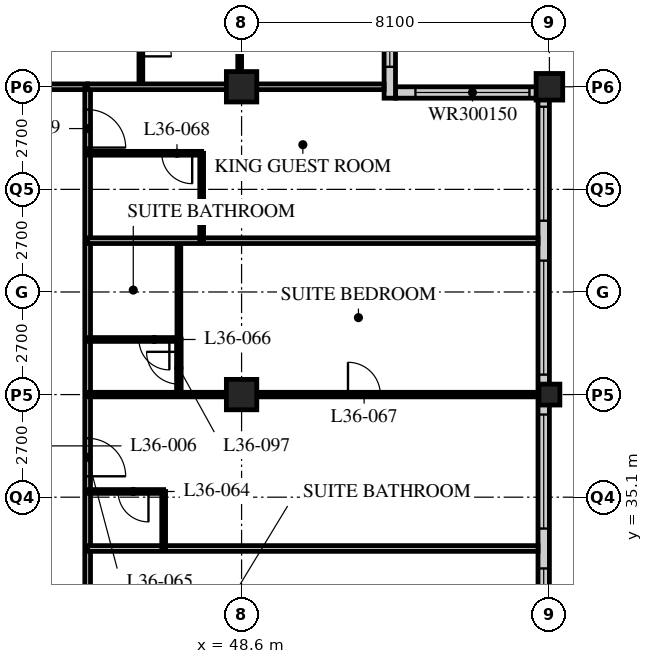
"""IFC4 building model, lengths in metres.
Left out: names, types, materials, properties, quantities, classifications, styles, units other than length and angle.
Written with IfcOpenShell. Run it as: python <this file> out.ifc"""

import sys

from ifc_helpers import new_model, si_unit, direction, frame, frame_2d, origin, origin_2d, place, context, subcontext, project, spatial, rectangle, hollow_rectangle, extrude, element, fill, save


model = new_model("IFC4")
c1 = context("Model", 3, precision=1e-05, world=origin(), true_north=direction((0.0, 1.0)))
c2 = subcontext(c1, "Body", "Model", "MODEL_VIEW")
j1 = project(units=[si_unit("LENGTHUNIT", "METRE"), si_unit("PLANEANGLEUNIT", "RADIAN")], contexts=[c1])
p1 = place(None, origin())
s1 = spatial("IfcSite", under=j1, at=p1, CompositionType="ELEMENT")
p2 = place(p1, origin())
s2 = spatial("IfcBuilding", under=s1, at=p2, CompositionType="ELEMENT")
p3 = place(p2, frame((0.0, 0.0, 140.8)))
s3 = spatial("IfcBuildingStorey", under=s2, at=p3, CompositionType="ELEMENT", Elevation=140.8)
for number, where, z_axis, x_axis in (
    (1, (48.6, 37.8, 0.0), (0.0, 0.0, 1.0), (1.0, 0.0, 0.0)),
    (2, (48.6, 45.9, 0.0), (0.0, 0.0, 1.0), (1.0, 0.0, 0.0)),
):
    element("IfcColumn", number, at=place(p3, frame(where, z_axis=z_axis, x_axis=x_axis)), inside=s3, PredefinedType="COLUMN", context=c2, shape_type="SweptSolid", body=[
        extrude(hollow_rectangle(XDim=0.8, YDim=0.8, WallThickness=0.08, at=origin_2d()), origin(), (0.0, 0.0, 1.0), 3.4),
    ])
p4 = place(p3, frame((56.7, 37.8, 0.0), z_axis=(0.0, 0.0, 1.0), x_axis=(1.0, 0.0, 0.0)))
e3 = element("IfcColumn", 3, at=p4, inside=s3, PredefinedType="COLUMN", context=c2, shape_type="SweptSolid", body=[
    extrude(hollow_rectangle(XDim=0.55, YDim=0.55, WallThickness=0.04, at=origin_2d()), origin(), (0.0, 0.0, 1.0), 3.4),
])
p5 = place(p3, frame((56.7, 45.9, 0.0), z_axis=(0.0, 0.0, 1.0), x_axis=(1.0, 0.0, 0.0)))
e4 = element("IfcColumn", 4, at=p5, inside=s3, PredefinedType="COLUMN", context=c2, shape_type="SweptSolid", body=[
    extrude(hollow_rectangle(XDim=0.7, YDim=0.7, WallThickness=0.07, at=origin_2d()), origin(), (0.0, 0.0, 1.0), 3.4),
])
p6 = place(p3, frame((56.55, 13.8, 0.0), z_axis=(0.0, 0.0, 1.0), x_axis=(0.0, 1.0, 0.0)))
e5 = element("IfcWall", 5, at=p6, inside=s3, PredefinedType="SOLIDWALL", context=c2, shape_type="SweptSolid", body=[
    extrude(rectangle(XDim=32.1, YDim=0.3, at=frame_2d((16.05, 0.0))), origin(), (0.0, 0.0, 1.0), 3.19),
])
p7 = place(p6, frame((0.225, 0.0, 0.9)))
e6 = element("IfcOpeningElement", 6, at=p7, cuts=e5, PredefinedType="OPENING", context=c2, shape_type="SweptSolid", body=[
    extrude(rectangle(XDim=3.0, YDim=2.0, at=frame_2d((1.5, 1.0))), frame((0.0, 0.16, 0.0), z_axis=(0.0, -1.0, 0.0), x_axis=(1.0, 0.0, 0.0)), (0.0, 0.0, 1.0), 0.32),
])
p8 = place(p6, frame((4.275, 0.0, 0.9)))
e7 = element("IfcOpeningElement", 7, at=p8, cuts=e5, PredefinedType="OPENING", context=c2, shape_type="SweptSolid", body=[
    extrude(rectangle(XDim=3.0, YDim=2.0, at=frame_2d((1.5, 1.0))), frame((0.0, 0.16, 0.0), z_axis=(0.0, -1.0, 0.0), x_axis=(1.0, 0.0, 0.0)), (0.0, 0.0, 1.0), 0.32),
])
p9 = place(p6, frame((8.325, 0.0, 0.9)))
e8 = element("IfcOpeningElement", 8, at=p9, cuts=e5, PredefinedType="OPENING", context=c2, shape_type="SweptSolid", body=[
    extrude(rectangle(XDim=3.0, YDim=2.0, at=frame_2d((1.5, 1.0))), frame((0.0, 0.16, 0.0), z_axis=(0.0, -1.0, 0.0), x_axis=(1.0, 0.0, 0.0)), (0.0, 0.0, 1.0), 0.32),
])
p10 = place(p6, frame((12.375, 0.0, 0.9)))
e9 = element("IfcOpeningElement", 9, at=p10, cuts=e5, PredefinedType="OPENING", context=c2, shape_type="SweptSolid", body=[
    extrude(rectangle(XDim=3.0, YDim=2.0, at=frame_2d((1.5, 1.0))), frame((0.0, 0.16, 0.0), z_axis=(0.0, -1.0, 0.0), x_axis=(1.0, 0.0, 0.0)), (0.0, 0.0, 1.0), 0.32),
])
p11 = place(p6, frame((16.425, 0.0, 0.9)))
e10 = element("IfcOpeningElement", 10, at=p11, cuts=e5, PredefinedType="OPENING", context=c2, shape_type="SweptSolid", body=[
    extrude(rectangle(XDim=3.0, YDim=2.0, at=frame_2d((1.5, 1.0))), frame((0.0, 0.16, 0.0), z_axis=(0.0, -1.0, 0.0), x_axis=(1.0, 0.0, 0.0)), (0.0, 0.0, 1.0), 0.32),
])
p12 = place(p6, frame((20.475, 0.0, 0.9)))
e11 = element("IfcOpeningElement", 11, at=p12, cuts=e5, PredefinedType="OPENING", context=c2, shape_type="SweptSolid", body=[
    extrude(rectangle(XDim=3.0, YDim=2.0, at=frame_2d((1.5, 1.0))), frame((0.0, 0.16, 0.0), z_axis=(0.0, -1.0, 0.0), x_axis=(1.0, 0.0, 0.0)), (0.0, 0.0, 1.0), 0.32),
])
p13 = place(p6, frame((24.525, 0.0, 0.9)))
e12 = element("IfcOpeningElement", 12, at=p13, cuts=e5, PredefinedType="OPENING", context=c2, shape_type="SweptSolid", body=[
    extrude(rectangle(XDim=3.0, YDim=2.0, at=frame_2d((1.5, 1.0))), frame((0.0, 0.16, 0.0), z_axis=(0.0, -1.0, 0.0), x_axis=(1.0, 0.0, 0.0)), (0.0, 0.0, 1.0), 0.32),
])
p14 = place(p6, frame((28.575, 0.0, 0.9)))
e13 = element("IfcOpeningElement", 13, at=p14, cuts=e5, PredefinedType="OPENING", context=c2, shape_type="SweptSolid", body=[
    extrude(rectangle(XDim=3.0, YDim=2.0, at=frame_2d((1.5, 1.0))), frame((0.0, 0.16, 0.0), z_axis=(0.0, -1.0, 0.0), x_axis=(1.0, 0.0, 0.0)), (0.0, 0.0, 1.0), 0.32),
])
p15 = place(p3, frame((56.4, 45.75, 0.0), z_axis=(0.0, 0.0, 1.0), x_axis=(-1.0, 0.0, 0.0)))
e14 = element("IfcWall", 14, at=p15, inside=s3, PredefinedType="SOLIDWALL", context=c2, shape_type="SweptSolid", body=[
    extrude(rectangle(XDim=3.75, YDim=0.3, at=frame_2d((1.875, 0.0))), origin(), (0.0, 0.0, 1.0), 3.19),
])
p16 = place(p15, frame((0.225, 0.0, 0.9)))
e15 = element("IfcOpeningElement", 15, at=p16, cuts=e14, PredefinedType="OPENING", context=c2, shape_type="SweptSolid", body=[
    extrude(rectangle(XDim=3.0, YDim=1.5, at=frame_2d((1.5, 0.75))), frame((0.0, 0.16, 0.0), z_axis=(0.0, -1.0, 0.0), x_axis=(1.0, 0.0, 0.0)), (0.0, 0.0, 1.0), 0.32),
])
p17 = place(p3, frame((52.5, 45.6, 0.0), z_axis=(0.0, 0.0, 1.0), x_axis=(0.0, 1.0, 0.0)))
e16 = element("IfcWall", 16, at=p17, inside=s3, PredefinedType="SOLIDWALL", context=c2, shape_type="SweptSolid", body=[
    extrude(rectangle(XDim=4.35, YDim=0.3, at=frame_2d((2.175, 0.0))), origin(), (0.0, 0.0, 1.0), 3.19),
])
p18 = place(p17, frame((0.825, 0.0, 0.9)))
e17 = element("IfcOpeningElement", 17, at=p18, cuts=e16, PredefinedType="OPENING", context=c2, shape_type="SweptSolid", body=[
    extrude(rectangle(XDim=3.0, YDim=1.5, at=frame_2d((1.5, 0.75))), frame((0.0, 0.16, 0.0), z_axis=(0.0, -1.0, 0.0), x_axis=(1.0, 0.0, 0.0)), (0.0, 0.0, 1.0), 0.32),
])
p19 = place(p3, frame((8.1, 45.9, 0.0), z_axis=(0.0, 0.0, 1.0), x_axis=(1.0, 0.0, 0.0)))
e18 = element("IfcWall", 18, at=p19, inside=s3, PredefinedType="PARTITIONING", context=c2, shape_type="SweptSolid", body=[
    extrude(rectangle(XDim=36.45, YDim=0.15, at=frame_2d((18.225, 0.0))), origin(), (0.0, 0.0, 1.0), 2.578),
])
p20 = place(p19, frame((9.625, 0.0, 0.0)))
e19 = element("IfcOpeningElement", 19, at=p20, cuts=e18, PredefinedType="OPENING", context=c2, shape_type="SweptSolid", body=[
    extrude(rectangle(XDim=1.0, YDim=2.1, at=frame_2d((0.5, 1.05))), frame((0.0, 0.085, 0.0), z_axis=(0.0, -1.0, 0.0), x_axis=(1.0, 0.0, 0.0)), (0.0, 0.0, 1.0), 0.17),
])
p21 = place(p19, frame((21.775, 0.0, 0.0)))
e20 = element("IfcOpeningElement", 20, at=p21, cuts=e18, PredefinedType="OPENING", context=c2, shape_type="SweptSolid", body=[
    extrude(rectangle(XDim=1.0, YDim=2.1, at=frame_2d((0.5, 1.05))), frame((0.0, 0.085, 0.0), z_axis=(0.0, -1.0, 0.0), x_axis=(1.0, 0.0, 0.0)), (0.0, 0.0, 1.0), 0.17),
])
p22 = place(p19, frame((28.95, 0.0, 0.0)))
e21 = element("IfcOpeningElement", 21, at=p22, cuts=e18, PredefinedType="OPENING", context=c2, shape_type="SweptSolid", body=[
    extrude(rectangle(XDim=1.0, YDim=2.1, at=frame_2d((0.5, 1.05))), frame((0.0, 0.085, 0.0), z_axis=(0.0, -1.0, 0.0), x_axis=(1.0, 0.0, 0.0)), (0.0, 0.0, 1.0), 0.17),
])
p23 = place(p19, frame((33.925, 0.0, 0.0)))
e22 = element("IfcOpeningElement", 22, at=p23, cuts=e18, PredefinedType="OPENING", context=c2, shape_type="SweptSolid", body=[
    extrude(rectangle(XDim=1.0, YDim=2.1, at=frame_2d((0.5, 1.05))), frame((0.0, 0.085, 0.0), z_axis=(0.0, -1.0, 0.0), x_axis=(1.0, 0.0, 0.0)), (0.0, 0.0, 1.0), 0.17),
])
p24 = place(p19, frame((2.625, 0.0, 0.0)))
e23 = element("IfcOpeningElement", 23, at=p24, cuts=e18, PredefinedType="OPENING", context=c2, shape_type="SweptSolid", body=[
    extrude(rectangle(XDim=1.0, YDim=2.1, at=frame_2d((0.5, 1.05))), frame((0.0, 0.085, 0.0), z_axis=(0.0, -1.0, 0.0), x_axis=(1.0, 0.0, 0.0)), (0.0, 0.0, 1.0), 0.17),
])
p25 = place(p3, frame((44.55, 17.55, 0.0), z_axis=(0.0, 0.0, 1.0), x_axis=(0.0, 1.0, 0.0)))
e24 = element("IfcWall", 24, at=p25, inside=s3, PredefinedType="PARTITIONING", context=c2, shape_type="SweptSolid", body=[
    extrude(rectangle(XDim=28.35, YDim=0.15, at=frame_2d((14.175, 0.0))), origin(), (0.0, 0.0, 1.0), 3.19),
])
p26 = place(p25, frame((2.75, 0.0, 0.0)))
e25 = element("IfcOpeningElement", 25, at=p26, cuts=e24, PredefinedType="OPENING", context=c2, shape_type="SweptSolid", body=[
    extrude(rectangle(XDim=1.0, YDim=2.1, at=frame_2d((0.5, 1.05))), frame((0.0, 0.085, 0.0), z_axis=(0.0, -1.0, 0.0), x_axis=(1.0, 0.0, 0.0)), (0.0, 0.0, 1.0), 0.17),
])
p27 = place(p25, frame((6.5, 0.0, 0.0)))
e26 = element("IfcOpeningElement", 26, at=p27, cuts=e24, PredefinedType="OPENING", context=c2, shape_type="SweptSolid", body=[
    extrude(rectangle(XDim=1.0, YDim=2.1, at=frame_2d((0.5, 1.05))), frame((0.0, 0.085, 0.0), z_axis=(0.0, -1.0, 0.0), x_axis=(1.0, 0.0, 0.0)), (0.0, 0.0, 1.0), 0.17),
])
p28 = place(p25, frame((13.55, 0.0, 0.0)))
e27 = element("IfcOpeningElement", 27, at=p28, cuts=e24, PredefinedType="OPENING", context=c2, shape_type="SweptSolid", body=[
    extrude(rectangle(XDim=1.0, YDim=2.1, at=frame_2d((0.5, 1.05))), frame((0.0, 0.085, 0.0), z_axis=(0.0, -1.0, 0.0), x_axis=(1.0, 0.0, 0.0)), (0.0, 0.0, 1.0), 0.17),
])
p29 = place(p25, frame((18.1, 0.0, 0.0)))
e28 = element("IfcOpeningElement", 28, at=p29, cuts=e24, PredefinedType="OPENING", context=c2, shape_type="SweptSolid", body=[
    extrude(rectangle(XDim=1.0, YDim=2.1, at=frame_2d((0.5, 1.05))), frame((0.0, 0.085, 0.0), z_axis=(0.0, -1.0, 0.0), x_axis=(1.0, 0.0, 0.0)), (0.0, 0.0, 1.0), 0.17),
])
p30 = place(p25, frame((26.75, 0.0, 0.0)))
e29 = element("IfcOpeningElement", 29, at=p30, cuts=e24, PredefinedType="OPENING", context=c2, shape_type="SweptSolid", body=[
    extrude(rectangle(XDim=1.0, YDim=2.1, at=frame_2d((0.5, 1.05))), frame((0.0, 0.085, 0.0), z_axis=(0.0, -1.0, 0.0), x_axis=(1.0, 0.0, 0.0)), (0.0, 0.0, 1.0), 0.17),
])
p31 = place(p3, frame((44.55, 33.75, 0.0), z_axis=(0.0, 0.0, 1.0), x_axis=(1.0, 0.0, 0.0)))
e30 = element("IfcWall", 30, at=p31, inside=s3, PredefinedType="PARTITIONING", context=c2, shape_type="SweptSolid", body=[
    extrude(rectangle(XDim=11.85, YDim=0.15, at=frame_2d((5.925, 0.0))), origin(), (0.0, 0.0, 1.0), 3.19),
])
p32 = place(p3, frame((46.55, 33.75, 0.0), z_axis=(0.0, 0.0, 1.0), x_axis=(0.0, 1.0, 0.0)))
e31 = element("IfcWall", 31, at=p32, inside=s3, PredefinedType="PARTITIONING", context=c2, shape_type="SweptSolid", body=[
    extrude(rectangle(XDim=1.5, YDim=0.1, at=frame_2d((0.75, 0.0))), origin(), (0.0, 0.0, 1.0), 3.19),
])
p33 = place(p3, frame((44.55, 35.25, 0.0), z_axis=(0.0, 0.0, 1.0), x_axis=(1.0, 0.0, 0.0)))
e32 = element("IfcWall", 32, at=p33, inside=s3, PredefinedType="PARTITIONING", context=c2, shape_type="SweptSolid", body=[
    extrude(rectangle(XDim=2.0, YDim=0.1, at=frame_2d((1.0, 0.0))), origin(), (0.0, 0.0, 1.0), 3.19),
])
p34 = place(p33, frame((0.8, 0.0, 0.0)))
e33 = element("IfcOpeningElement", 33, at=p34, cuts=e32, PredefinedType="OPENING", context=c2, shape_type="SweptSolid", body=[
    extrude(rectangle(XDim=0.8, YDim=2.1, at=frame_2d((0.4, 1.05))), frame((0.0, 0.06, 0.0), z_axis=(0.0, -1.0, 0.0), x_axis=(1.0, 0.0, 0.0)), (0.0, 0.0, 1.0), 0.12),
])
p35 = place(p3, frame((46.95, 39.25, 0.0), z_axis=(0.0, 0.0, 1.0), x_axis=(0.0, 1.0, 0.0)))
e34 = element("IfcWall", 34, at=p35, inside=s3, PredefinedType="PARTITIONING", context=c2, shape_type="SweptSolid", body=[
    extrude(rectangle(XDim=2.6, YDim=0.1, at=frame_2d((1.3, 0.0))), origin(), (0.0, 0.0, 1.0), 3.19),
])
p36 = place(p3, frame((44.55, 39.25, 0.0), z_axis=(0.0, 0.0, 1.0), x_axis=(1.0, 0.0, 0.0)))
e35 = element("IfcWall", 35, at=p36, inside=s3, PredefinedType="PARTITIONING", context=c2, shape_type="SweptSolid", body=[
    extrude(rectangle(XDim=2.4, YDim=0.1, at=frame_2d((1.2, 0.0))), origin(), (0.0, 0.0, 1.0), 3.19),
])
p37 = place(p36, frame((1.35, 0.0, 0.0)))
e36 = element("IfcOpeningElement", 36, at=p37, cuts=e35, PredefinedType="OPENING", context=c2, shape_type="SweptSolid", body=[
    extrude(rectangle(XDim=0.8, YDim=2.1, at=frame_2d((0.4, 1.05))), frame((0.0, 0.06, 0.0), z_axis=(0.0, -1.0, 0.0), x_axis=(1.0, 0.0, 0.0)), (0.0, 0.0, 1.0), 0.12),
])
p38 = place(p3, frame((44.55, 37.8, 0.0), z_axis=(0.0, 0.0, 1.0), x_axis=(1.0, 0.0, 0.0)))
e37 = element("IfcWall", 37, at=p38, inside=s3, PredefinedType="PARTITIONING", context=c2, shape_type="SweptSolid", body=[
    extrude(rectangle(XDim=11.85, YDim=0.12, at=frame_2d((5.925, 0.0))), origin(), (0.0, 0.0, 1.0), 2.578),
])
p39 = place(p38, frame((6.85, 0.0, 0.0)))
e38 = element("IfcOpeningElement", 38, at=p39, cuts=e37, PredefinedType="OPENING", context=c2, shape_type="SweptSolid", body=[
    extrude(rectangle(XDim=0.85, YDim=2.1, at=frame_2d((0.425, 1.05))), frame((0.0, 0.07, 0.0), z_axis=(0.0, -1.0, 0.0), x_axis=(1.0, 0.0, 0.0)), (0.0, 0.0, 1.0), 0.14),
])
p40 = place(p3, frame((44.55, 41.85, 0.0), z_axis=(0.0, 0.0, 1.0), x_axis=(1.0, 0.0, 0.0)))
e39 = element("IfcWall", 39, at=p40, inside=s3, PredefinedType="PARTITIONING", context=c2, shape_type="SweptSolid", body=[
    extrude(rectangle(XDim=11.85, YDim=0.15, at=frame_2d((5.925, 0.0))), origin(), (0.0, 0.0, 1.0), 3.19),
])
p41 = place(p3, frame((47.55, 41.85, 0.0), z_axis=(0.0, 0.0, 1.0), x_axis=(0.0, 1.0, 0.0)))
e40 = element("IfcWall", 40, at=p41, inside=s3, PredefinedType="PARTITIONING", context=c2, shape_type="SweptSolid", body=[
    extrude(rectangle(XDim=2.3, YDim=0.1, at=frame_2d((1.15, 0.0))), origin(), (0.0, 0.0, 1.0), 3.19),
])
p42 = place(p3, frame((44.55, 44.15, 0.0), z_axis=(0.0, 0.0, 1.0), x_axis=(1.0, 0.0, 0.0)))
e41 = element("IfcWall", 41, at=p42, inside=s3, PredefinedType="PARTITIONING", context=c2, shape_type="SweptSolid", body=[
    extrude(rectangle(XDim=3.0, YDim=0.1, at=frame_2d((1.5, 0.0))), origin(), (0.0, 0.0, 1.0), 3.19),
])
p43 = place(p42, frame((1.95, 0.0, 0.0)))
e42 = element("IfcOpeningElement", 42, at=p43, cuts=e41, PredefinedType="OPENING", context=c2, shape_type="SweptSolid", body=[
    extrude(rectangle(XDim=0.8, YDim=2.1, at=frame_2d((0.4, 1.05))), frame((0.0, 0.06, 0.0), z_axis=(0.0, -1.0, 0.0), x_axis=(1.0, 0.0, 0.0)), (0.0, 0.0, 1.0), 0.12),
])
p44 = place(p3, frame((45.95, 45.9, 0.0), z_axis=(0.0, 0.0, 1.0), x_axis=(0.0, 1.0, 0.0)))
e43 = element("IfcWall", 43, at=p44, inside=s3, PredefinedType="PARTITIONING", context=c2, shape_type="SweptSolid", body=[
    extrude(rectangle(XDim=2.4, YDim=0.1, at=frame_2d((1.2, 0.0))), origin(), (0.0, 0.0, 1.0), 3.19),
])
p45 = place(p44, frame((0.8, 0.0, 0.0)))
e44 = element("IfcOpeningElement", 44, at=p45, cuts=e43, PredefinedType="OPENING", context=c2, shape_type="SweptSolid", body=[
    extrude(rectangle(XDim=0.8, YDim=2.1, at=frame_2d((0.4, 1.05))), frame((0.0, 0.06, 0.0), z_axis=(0.0, -1.0, 0.0), x_axis=(1.0, 0.0, 0.0)), (0.0, 0.0, 1.0), 0.12),
])
p46 = place(p3, frame((48.55, 45.9, 0.0), z_axis=(0.0, 0.0, 1.0), x_axis=(0.0, 1.0, 0.0)))
e45 = element("IfcWall", 45, at=p46, inside=s3, PredefinedType="PARTITIONING", context=c2, shape_type="SweptSolid", body=[
    extrude(rectangle(XDim=2.4, YDim=0.1, at=frame_2d((1.2, 0.0))), origin(), (0.0, 0.0, 1.0), 2.578),
])
p47 = place(p3, frame((44.55, 45.9, 0.0), z_axis=(0.0, 0.0, 1.0), x_axis=(1.0, 0.0, 0.0)))
e46 = element("IfcWall", 46, at=p47, inside=s3, PredefinedType="PARTITIONING", context=c2, shape_type="SweptSolid", body=[
    extrude(rectangle(XDim=7.8, YDim=0.15, at=frame_2d((3.9, 0.0))), origin(), (0.0, 0.0, 1.0), 2.578),
])
p48 = place(p3, frame((46.95, 39.26, 0.0), z_axis=(0.0, 0.0, 1.0), x_axis=(0.0, -1.0, 0.0)))
e47 = element("IfcWall", 47, at=p48, inside=s3, PredefinedType="PARTITIONING", context=c2, shape_type="SweptSolid", body=[
    extrude(rectangle(XDim=1.46, YDim=0.12, at=frame_2d((0.73, 0.0))), origin(), (0.0, 0.0, 1.0), 3.19),
])
p49 = place(p48, frame((0.335, 0.0, 0.0)))
e48 = element("IfcOpeningElement", 48, at=p49, cuts=e47, PredefinedType="OPENING", context=c2, shape_type="SweptSolid", body=[
    extrude(rectangle(XDim=0.85, YDim=2.1, at=frame_2d((0.425, 1.05))), frame((0.0, 0.07, 0.0), z_axis=(0.0, -1.0, 0.0), x_axis=(1.0, 0.0, 0.0)), (0.0, 0.0, 1.0), 0.14),
])
p50 = place(p11, origin())
e49 = element("IfcWindow", 49, at=p50, inside=s3, PartitioningType="SINGLE_PANEL", PredefinedType="WINDOW", context=c2, shape_type="SweptSolid", body=[
    extrude(rectangle(XDim=3.0, YDim=2.0, at=frame_2d((1.5, 1.0))), frame((0.0, 0.03, 0.0), z_axis=(0.0, -1.0, 0.0), x_axis=(1.0, 0.0, 0.0)), (0.0, 0.0, 1.0), 0.06),
])
fill(e10, e49)
p51 = place(p12, origin())
e50 = element("IfcWindow", 50, at=p51, inside=s3, PartitioningType="SINGLE_PANEL", PredefinedType="WINDOW", context=c2, shape_type="SweptSolid", body=[
    extrude(rectangle(XDim=3.0, YDim=2.0, at=frame_2d((1.5, 1.0))), frame((0.0, 0.03, 0.0), z_axis=(0.0, -1.0, 0.0), x_axis=(1.0, 0.0, 0.0)), (0.0, 0.0, 1.0), 0.06),
])
fill(e11, e50)
p52 = place(p13, origin())
e51 = element("IfcWindow", 51, at=p52, inside=s3, PartitioningType="SINGLE_PANEL", PredefinedType="WINDOW", context=c2, shape_type="SweptSolid", body=[
    extrude(rectangle(XDim=3.0, YDim=2.0, at=frame_2d((1.5, 1.0))), frame((0.0, 0.03, 0.0), z_axis=(0.0, -1.0, 0.0), x_axis=(1.0, 0.0, 0.0)), (0.0, 0.0, 1.0), 0.06),
])
fill(e12, e51)
p53 = place(p14, origin())
e52 = element("IfcWindow", 52, at=p53, inside=s3, PartitioningType="SINGLE_PANEL", PredefinedType="WINDOW", context=c2, shape_type="SweptSolid", body=[
    extrude(rectangle(XDim=3.0, YDim=2.0, at=frame_2d((1.5, 1.0))), frame((0.0, 0.03, 0.0), z_axis=(0.0, -1.0, 0.0), x_axis=(1.0, 0.0, 0.0)), (0.0, 0.0, 1.0), 0.06),
])
fill(e13, e52)
p54 = place(p16, origin())
e53 = element("IfcWindow", 53, at=p54, inside=s3, PartitioningType="SINGLE_PANEL", PredefinedType="WINDOW", context=c2, shape_type="SweptSolid", body=[
    extrude(rectangle(XDim=3.0, YDim=1.5, at=frame_2d((1.5, 0.75))), frame((0.0, 0.03, 0.0), z_axis=(0.0, -1.0, 0.0), x_axis=(1.0, 0.0, 0.0)), (0.0, 0.0, 1.0), 0.06),
])
fill(e15, e53)
p55 = place(p18, origin())
e54 = element("IfcWindow", 54, at=p55, inside=s3, PartitioningType="SINGLE_PANEL", PredefinedType="WINDOW", context=c2, shape_type="SweptSolid", body=[
    extrude(rectangle(XDim=3.0, YDim=1.5, at=frame_2d((1.5, 0.75))), frame((0.0, 0.03, 0.0), z_axis=(0.0, -1.0, 0.0), x_axis=(1.0, 0.0, 0.0)), (0.0, 0.0, 1.0), 0.06),
])
fill(e17, e54)
p56 = place(p34, origin())
e55 = element("IfcDoor", 55, at=p56, inside=s3, OperationType="SINGLE_SWING_LEFT", PredefinedType="DOOR", context=c2, shape_type="SweptSolid", body=[
    extrude(rectangle(XDim=0.8, YDim=2.1, at=frame_2d((0.4, 1.05))), frame((0.0, 0.025, 0.0), z_axis=(0.0, -1.0, 0.0), x_axis=(1.0, 0.0, 0.0)), (0.0, 0.0, 1.0), 0.05),
])
fill(e33, e55)
p57 = place(p29, origin())
e56 = element("IfcDoor", 56, at=p57, inside=s3, OperationType="SINGLE_SWING_RIGHT", PredefinedType="DOOR", context=c2, shape_type="SweptSolid", body=[
    extrude(rectangle(XDim=1.0, YDim=2.1, at=frame_2d((0.5, 1.05))), frame((0.0, 0.025, 0.0), z_axis=(0.0, -1.0, 0.0), x_axis=(1.0, 0.0, 0.0)), (0.0, 0.0, 1.0), 0.05),
])
fill(e28, e56)
p58 = place(p37, origin())
e57 = element("IfcDoor", 57, at=p58, inside=s3, OperationType="SINGLE_SWING_LEFT", PredefinedType="DOOR", context=c2, shape_type="SweptSolid", body=[
    extrude(rectangle(XDim=0.8, YDim=2.1, at=frame_2d((0.4, 1.05))), frame((0.0, 0.025, 0.0), z_axis=(0.0, -1.0, 0.0), x_axis=(1.0, 0.0, 0.0)), (0.0, 0.0, 1.0), 0.05),
])
fill(e36, e57)
p59 = place(p39, origin())
e58 = element("IfcDoor", 58, at=p59, inside=s3, OperationType="SINGLE_SWING_LEFT", PredefinedType="DOOR", context=c2, shape_type="SweptSolid", body=[
    extrude(rectangle(XDim=0.85, YDim=2.1, at=frame_2d((0.425, 1.05))), frame((0.0, 0.025, 0.0), z_axis=(0.0, -1.0, 0.0), x_axis=(1.0, 0.0, 0.0)), (0.0, 0.0, 1.0), 0.05),
])
fill(e38, e58)
p60 = place(p43, origin())
e59 = element("IfcDoor", 59, at=p60, inside=s3, OperationType="SINGLE_SWING_LEFT", PredefinedType="DOOR", context=c2, shape_type="SweptSolid", body=[
    extrude(rectangle(XDim=0.8, YDim=2.1, at=frame_2d((0.4, 1.05))), frame((0.0, 0.025, 0.0), z_axis=(0.0, -1.0, 0.0), x_axis=(1.0, 0.0, 0.0)), (0.0, 0.0, 1.0), 0.05),
])
fill(e42, e59)
p61 = place(p30, origin())
e60 = element("IfcDoor", 60, at=p61, inside=s3, OperationType="SINGLE_SWING_RIGHT", PredefinedType="DOOR", context=c2, shape_type="SweptSolid", body=[
    extrude(rectangle(XDim=1.0, YDim=2.1, at=frame_2d((0.5, 1.05))), frame((0.0, 0.025, 0.0), z_axis=(0.0, -1.0, 0.0), x_axis=(1.0, 0.0, 0.0)), (0.0, 0.0, 1.0), 0.05),
])
fill(e29, e60)
p62 = place(p45, origin())
e61 = element("IfcDoor", 61, at=p62, inside=s3, OperationType="SINGLE_SWING_RIGHT", PredefinedType="DOOR", context=c2, shape_type="SweptSolid", body=[
    extrude(rectangle(XDim=0.8, YDim=2.1, at=frame_2d((0.4, 1.05))), frame((0.0, 0.025, 0.0), z_axis=(0.0, -1.0, 0.0), x_axis=(1.0, 0.0, 0.0)), (0.0, 0.0, 1.0), 0.05),
])
fill(e44, e61)
p63 = place(p49, origin())
e62 = element("IfcDoor", 62, at=p63, inside=s3, OperationType="SINGLE_SWING_RIGHT", PredefinedType="DOOR", context=c2, shape_type="SweptSolid", body=[
    extrude(rectangle(XDim=0.85, YDim=2.1, at=frame_2d((0.425, 1.05))), frame((0.0, 0.025, 0.0), z_axis=(0.0, -1.0, 0.0), x_axis=(1.0, 0.0, 0.0)), (0.0, 0.0, 1.0), 0.05),
])
fill(e48, e62)
save(model, sys.argv[1])
